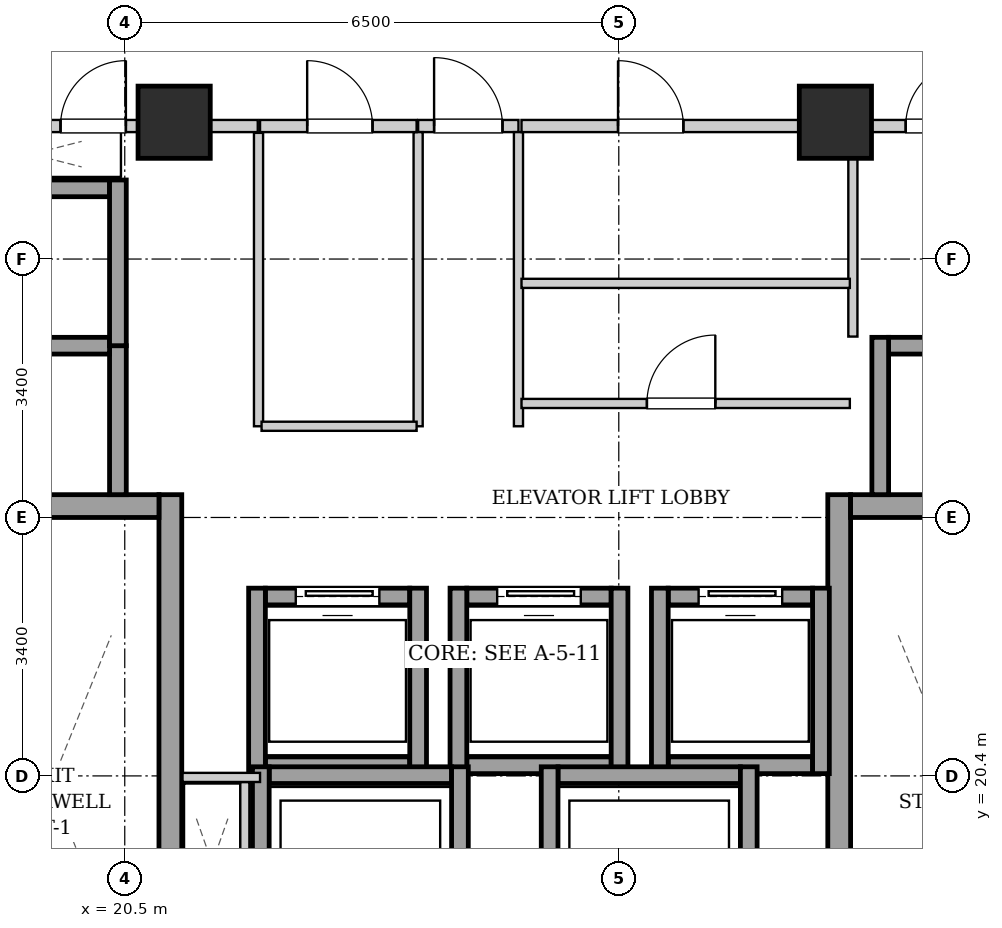
"""IFC4 building model, lengths in metres.
Left out: names, types, materials, properties, quantities, classifications, styles, units other than length and angle.
Written with IfcOpenShell. Run it as: python <this file> out.ifc"""

import sys

from ifc_helpers import new_model, si_unit, direction, frame, frame_2d, origin, origin_2d, place, context, subcontext, project, spatial, rectangle, extrude, element, fill, save


model = new_model("IFC4")
c1 = context("Model", 3, precision=1e-05, world=origin(), true_north=direction((0.0, 1.0)))
c2 = subcontext(c1, "Body", "Model", "MODEL_VIEW")
j1 = project(units=[si_unit("LENGTHUNIT", "METRE"), si_unit("PLANEANGLEUNIT", "RADIAN")], contexts=[c1])
p1 = place(None, origin())
s1 = spatial("IfcSite", under=j1, at=p1, CompositionType="ELEMENT")
p2 = place(p1, origin())
s2 = spatial("IfcBuilding", under=s1, at=p2, CompositionType="ELEMENT")
p3 = place(p2, frame((0.0, 0.0, 134.15)))
s3 = spatial("IfcBuildingStorey", under=s2, at=p3, CompositionType="ELEMENT", Elevation=134.15)
for number, where, z_axis, x_axis in (
    (1, (21.15, 29.0, 0.0), (0.0, 0.0, 1.0), (1.0, 0.0, 0.0)),
    (2, (29.85, 29.0, 0.0), (0.0, 0.0, 1.0), (1.0, 0.0, 0.0)),
):
    element("IfcColumn", number, at=place(p3, frame(where, z_axis=z_axis, x_axis=x_axis)), inside=s3, PredefinedType="COLUMN", context=c2, shape_type="SweptSolid", body=[
        extrude(rectangle(XDim=0.95, YDim=0.95, at=origin_2d()), origin(), (0.0, 0.0, 1.0), 3.25),
    ])
p4 = place(p3, frame((21.1, 15.1, 0.0), z_axis=(0.0, 0.0, 1.0), x_axis=(0.0, 1.0, 0.0)))
e3 = element("IfcWall", 3, at=p4, inside=s3, PredefinedType="SHEAR", context=c2, shape_type="SweptSolid", body=[
    extrude(rectangle(XDim=9.0, YDim=0.3, at=frame_2d((4.5, 0.0))), origin(), (0.0, 0.0, 1.0), 2.99),
])
p5 = place(p3, frame((18.1, 23.95, 0.0), z_axis=(0.0, 0.0, 1.0), x_axis=(1.0, 0.0, 0.0)))
e4 = element("IfcWall", 4, at=p5, inside=s3, PredefinedType="SHEAR", context=c2, shape_type="SweptSolid", body=[
    extrude(rectangle(XDim=2.85, YDim=0.3, at=frame_2d((1.425, 0.0))), origin(), (0.0, 0.0, 1.0), 2.99),
])
p6 = place(p3, frame((29.9, 15.1, 0.0), z_axis=(0.0, 0.0, 1.0), x_axis=(0.0, 1.0, 0.0)))
e5 = element("IfcWall", 5, at=p6, inside=s3, PredefinedType="SHEAR", context=c2, shape_type="SweptSolid", body=[
    extrude(rectangle(XDim=9.0, YDim=0.3, at=frame_2d((4.5, 0.0))), origin(), (0.0, 0.0, 1.0), 2.99),
])
p7 = place(p3, frame((30.05, 23.95, 0.0), z_axis=(0.0, 0.0, 1.0), x_axis=(1.0, 0.0, 0.0)))
e6 = element("IfcWall", 6, at=p7, inside=s3, PredefinedType="SHEAR", context=c2, shape_type="SweptSolid", body=[
    extrude(rectangle(XDim=2.85, YDim=0.3, at=frame_2d((1.425, 0.0))), origin(), (0.0, 0.0, 1.0), 2.99),
])
p8 = place(p3, frame((22.35, 20.54, 0.0), z_axis=(0.0, 0.0, 1.0), x_axis=(1.0, 0.0, 0.0)))
e7 = element("IfcWall", 7, at=p8, inside=s3, PredefinedType="SHEAR", context=c2, shape_type="SweptSolid", body=[
    extrude(rectangle(XDim=1.9, YDim=0.22, at=frame_2d((0.95, 0.0))), origin(), (0.0, 0.0, 1.0), 2.99),
])
p9 = place(p3, frame((22.35, 22.76, 0.0), z_axis=(0.0, 0.0, 1.0), x_axis=(1.0, 0.0, 0.0)))
e8 = element("IfcWall", 8, at=p9, inside=s3, PredefinedType="SHEAR", context=c2, shape_type="SweptSolid", body=[
    extrude(rectangle(XDim=1.9, YDim=0.22, at=frame_2d((0.95, 0.0))), origin(), (0.0, 0.0, 1.0), 2.99),
])
p10 = place(p9, frame((0.4, 0.0, 0.0)))
e9 = element("IfcOpeningElement", 9, at=p10, cuts=e8, PredefinedType="OPENING", context=c2, shape_type="SweptSolid", body=[
    extrude(rectangle(XDim=1.1, YDim=2.15, at=frame_2d((0.55, 1.075))), frame((0.0, 0.12, 0.0), z_axis=(0.0, -1.0, 0.0), x_axis=(1.0, 0.0, 0.0)), (0.0, 0.0, 1.0), 0.24),
])
for number, where, z_axis, x_axis in (
    (10, (22.24, 20.43, 0.0), (0.0, 0.0, 1.0), (0.0, 1.0, 0.0)),
    (11, (24.36, 20.43, 0.0), (0.0, 0.0, 1.0), (0.0, 1.0, 0.0)),
):
    element("IfcWall", number, at=place(p3, frame(where, z_axis=z_axis, x_axis=x_axis)), inside=s3, PredefinedType="SHEAR", context=c2, shape_type="SweptSolid", body=[
        extrude(rectangle(XDim=2.44, YDim=0.22, at=frame_2d((1.22, 0.0))), origin(), (0.0, 0.0, 1.0), 2.99),
    ])
p11 = place(p3, frame((25.0, 20.54, 0.0), z_axis=(0.0, 0.0, 1.0), x_axis=(1.0, 0.0, 0.0)))
e12 = element("IfcWall", 12, at=p11, inside=s3, PredefinedType="SHEAR", context=c2, shape_type="SweptSolid", body=[
    extrude(rectangle(XDim=1.9, YDim=0.22, at=frame_2d((0.95, 0.0))), origin(), (0.0, 0.0, 1.0), 2.99),
])
p12 = place(p3, frame((25.0, 22.76, 0.0), z_axis=(0.0, 0.0, 1.0), x_axis=(1.0, 0.0, 0.0)))
e13 = element("IfcWall", 13, at=p12, inside=s3, PredefinedType="SHEAR", context=c2, shape_type="SweptSolid", body=[
    extrude(rectangle(XDim=1.9, YDim=0.22, at=frame_2d((0.95, 0.0))), origin(), (0.0, 0.0, 1.0), 2.99),
])
p13 = place(p12, frame((0.4, 0.0, 0.0)))
e14 = element("IfcOpeningElement", 14, at=p13, cuts=e13, PredefinedType="OPENING", context=c2, shape_type="SweptSolid", body=[
    extrude(rectangle(XDim=1.1, YDim=2.15, at=frame_2d((0.55, 1.075))), frame((0.0, 0.12, 0.0), z_axis=(0.0, -1.0, 0.0), x_axis=(1.0, 0.0, 0.0)), (0.0, 0.0, 1.0), 0.24),
])
for number, where, z_axis, x_axis in (
    (15, (24.89, 20.43, 0.0), (0.0, 0.0, 1.0), (0.0, 1.0, 0.0)),
    (16, (27.01, 20.43, 0.0), (0.0, 0.0, 1.0), (0.0, 1.0, 0.0)),
):
    element("IfcWall", number, at=place(p3, frame(where, z_axis=z_axis, x_axis=x_axis)), inside=s3, PredefinedType="SHEAR", context=c2, shape_type="SweptSolid", body=[
        extrude(rectangle(XDim=2.44, YDim=0.22, at=frame_2d((1.22, 0.0))), origin(), (0.0, 0.0, 1.0), 2.99),
    ])
p14 = place(p3, frame((27.65, 20.54, 0.0), z_axis=(0.0, 0.0, 1.0), x_axis=(1.0, 0.0, 0.0)))
e17 = element("IfcWall", 17, at=p14, inside=s3, PredefinedType="SHEAR", context=c2, shape_type="SweptSolid", body=[
    extrude(rectangle(XDim=1.9, YDim=0.22, at=frame_2d((0.95, 0.0))), origin(), (0.0, 0.0, 1.0), 2.99),
])
p15 = place(p3, frame((27.65, 22.76, 0.0), z_axis=(0.0, 0.0, 1.0), x_axis=(1.0, 0.0, 0.0)))
e18 = element("IfcWall", 18, at=p15, inside=s3, PredefinedType="SHEAR", context=c2, shape_type="SweptSolid", body=[
    extrude(rectangle(XDim=1.9, YDim=0.22, at=frame_2d((0.95, 0.0))), origin(), (0.0, 0.0, 1.0), 2.99),
])
p16 = place(p15, frame((0.4, 0.0, 0.0)))
e19 = element("IfcOpeningElement", 19, at=p16, cuts=e18, PredefinedType="OPENING", context=c2, shape_type="SweptSolid", body=[
    extrude(rectangle(XDim=1.1, YDim=2.15, at=frame_2d((0.55, 1.075))), frame((0.0, 0.12, 0.0), z_axis=(0.0, -1.0, 0.0), x_axis=(1.0, 0.0, 0.0)), (0.0, 0.0, 1.0), 0.24),
])
for number, where, z_axis, x_axis in (
    (20, (27.54, 20.43, 0.0), (0.0, 0.0, 1.0), (0.0, 1.0, 0.0)),
    (21, (29.66, 20.43, 0.0), (0.0, 0.0, 1.0), (0.0, 1.0, 0.0)),
):
    element("IfcWall", number, at=place(p3, frame(where, z_axis=z_axis, x_axis=x_axis)), inside=s3, PredefinedType="SHEAR", context=c2, shape_type="SweptSolid", body=[
        extrude(rectangle(XDim=2.44, YDim=0.22, at=frame_2d((1.22, 0.0))), origin(), (0.0, 0.0, 1.0), 2.99),
    ])
p17 = place(p3, frame((20.41, 24.1, 0.0), z_axis=(0.0, 0.0, 1.0), x_axis=(0.0, 1.0, 0.0)))
e22 = element("IfcWall", 22, at=p17, inside=s3, PredefinedType="SHEAR", context=c2, shape_type="SweptSolid", body=[
    extrude(rectangle(XDim=1.96, YDim=0.22, at=frame_2d((0.98, 0.0))), origin(), (0.0, 0.0, 1.0), 2.99),
])
for number, where, z_axis, x_axis in (
    (23, (18.4, 26.06, 0.0), (0.0, 0.0, 1.0), (1.0, 0.0, 0.0)),
    (24, (18.4, 28.13, 0.0), (0.0, 0.0, 1.0), (1.0, 0.0, 0.0)),
):
    element("IfcWall", number, at=place(p3, frame(where, z_axis=z_axis, x_axis=x_axis)), inside=s3, PredefinedType="SHEAR", context=c2, shape_type="SweptSolid", body=[
        extrude(rectangle(XDim=1.9, YDim=0.22, at=frame_2d((0.95, 0.0))), origin(), (0.0, 0.0, 1.0), 2.99),
    ])
p18 = place(p3, frame((20.41, 26.06, 0.0), z_axis=(0.0, 0.0, 1.0), x_axis=(0.0, 1.0, 0.0)))
e25 = element("IfcWall", 25, at=p18, inside=s3, PredefinedType="SHEAR", context=c2, shape_type="SweptSolid", body=[
    extrude(rectangle(XDim=2.18, YDim=0.22, at=frame_2d((1.09, 0.0))), origin(), (0.0, 0.0, 1.0), 2.99),
])
p19 = place(p3, frame((30.55, 26.06, 0.0), z_axis=(0.0, 0.0, 1.0), x_axis=(1.0, 0.0, 0.0)))
e26 = element("IfcWall", 26, at=p19, inside=s3, PredefinedType="SHEAR", context=c2, shape_type="SweptSolid", body=[
    extrude(rectangle(XDim=1.9, YDim=0.22, at=frame_2d((0.95, 0.0))), origin(), (0.0, 0.0, 1.0), 2.99),
])
p20 = place(p3, frame((30.44, 24.1, 0.0), z_axis=(0.0, 0.0, 1.0), x_axis=(0.0, 1.0, 0.0)))
e27 = element("IfcWall", 27, at=p20, inside=s3, PredefinedType="SHEAR", context=c2, shape_type="SweptSolid", body=[
    extrude(rectangle(XDim=2.07, YDim=0.22, at=frame_2d((1.035, 0.0))), origin(), (0.0, 0.0, 1.0), 2.99),
])
p21 = place(p3, frame((22.4, 20.41, 0.0), z_axis=(0.0, 0.0, 1.0), x_axis=(1.0, 0.0, 0.0)))
e28 = element("IfcWall", 28, at=p21, inside=s3, PredefinedType="SHEAR", context=c2, shape_type="SweptSolid", body=[
    extrude(rectangle(XDim=2.4, YDim=0.22, at=frame_2d((1.2, 0.0))), origin(), (0.0, 0.0, 1.0), 2.99),
])
for number, where, z_axis, x_axis in (
    (29, (22.29, 17.98, 0.0), (0.0, 0.0, 1.0), (0.0, 1.0, 0.0)),
    (30, (24.91, 17.98, 0.0), (0.0, 0.0, 1.0), (0.0, 1.0, 0.0)),
):
    element("IfcWall", number, at=place(p3, frame(where, z_axis=z_axis, x_axis=x_axis)), inside=s3, PredefinedType="SHEAR", context=c2, shape_type="SweptSolid", body=[
        extrude(rectangle(XDim=2.54, YDim=0.22, at=frame_2d((1.27, 0.0))), origin(), (0.0, 0.0, 1.0), 2.99),
    ])
p22 = place(p3, frame((26.2, 20.41, 0.0), z_axis=(0.0, 0.0, 1.0), x_axis=(1.0, 0.0, 0.0)))
e31 = element("IfcWall", 31, at=p22, inside=s3, PredefinedType="SHEAR", context=c2, shape_type="SweptSolid", body=[
    extrude(rectangle(XDim=2.4, YDim=0.22, at=frame_2d((1.2, 0.0))), origin(), (0.0, 0.0, 1.0), 2.99),
])
for number, where, z_axis, x_axis in (
    (32, (26.09, 17.98, 0.0), (0.0, 0.0, 1.0), (0.0, 1.0, 0.0)),
    (33, (28.71, 17.98, 0.0), (0.0, 0.0, 1.0), (0.0, 1.0, 0.0)),
):
    element("IfcWall", number, at=place(p3, frame(where, z_axis=z_axis, x_axis=x_axis)), inside=s3, PredefinedType="SHEAR", context=c2, shape_type="SweptSolid", body=[
        extrude(rectangle(XDim=2.54, YDim=0.22, at=frame_2d((1.27, 0.0))), origin(), (0.0, 0.0, 1.0), 2.99),
    ])
p23 = place(p3, frame((24.36, 28.95, 0.0), z_axis=(0.0, 0.0, 1.0), x_axis=(1.0, 0.0, 0.0)))
e34 = element("IfcWall", 34, at=p23, inside=s3, PredefinedType="PARTITIONING", context=c2, shape_type="SweptSolid", body=[
    extrude(rectangle(XDim=1.32, YDim=0.16, at=frame_2d((0.66, 0.0))), origin(), (0.0, 0.0, 1.0), 2.426),
])
p24 = place(p23, frame((0.21, 0.0, 0.0)))
e35 = element("IfcOpeningElement", 35, at=p24, cuts=e34, PredefinedType="OPENING", context=c2, shape_type="SweptSolid", body=[
    extrude(rectangle(XDim=0.9, YDim=2.05, at=frame_2d((0.45, 1.025))), frame((0.0, 0.09, 0.0), z_axis=(0.0, -1.0, 0.0), x_axis=(1.0, 0.0, 0.0)), (0.0, 0.0, 1.0), 0.18),
])
p25 = place(p3, frame((17.96, 28.95, 0.0), z_axis=(0.0, 0.0, 1.0), x_axis=(1.0, 0.0, 0.0)))
e36 = element("IfcWall", 36, at=p25, inside=s3, PredefinedType="PARTITIONING", context=c2, shape_type="SweptSolid", body=[
    extrude(rectangle(XDim=4.29, YDim=0.16, at=frame_2d((2.145, 0.0))), origin(), (0.0, 0.0, 1.0), 2.426),
])
p26 = place(p25, frame((1.695, 0.0, 0.0)))
e37 = element("IfcOpeningElement", 37, at=p26, cuts=e36, PredefinedType="OPENING", context=c2, shape_type="SweptSolid", body=[
    extrude(rectangle(XDim=0.86, YDim=2.05, at=frame_2d((0.43, 1.025))), frame((0.0, 0.09, 0.0), z_axis=(0.0, -1.0, 0.0), x_axis=(1.0, 0.0, 0.0)), (0.0, 0.0, 1.0), 0.18),
])
p27 = place(p3, frame((22.08, 18.2, 0.0), z_axis=(0.0, 0.0, 1.0), x_axis=(0.0, 1.0, 0.0)))
e38 = element("IfcWall", 38, at=p27, inside=s3, PredefinedType="PARTITIONING", context=c2, shape_type="SweptSolid", body=[
    extrude(rectangle(XDim=2.12, YDim=0.12, at=frame_2d((1.06, 0.0))), origin(), (0.0, 0.0, 1.0), 2.99),
])
p28 = place(p3, frame((22.28, 20.38, 0.0), z_axis=(0.0, 0.0, 1.0), x_axis=(-1.0, 0.0, 0.0)))
e39 = element("IfcWall", 39, at=p28, inside=s3, PredefinedType="PARTITIONING", context=c2, shape_type="SweptSolid", body=[
    extrude(rectangle(XDim=1.02, YDim=0.12, at=frame_2d((0.51, 0.0))), origin(), (0.0, 0.0, 1.0), 2.99),
])
for number, where, z_axis, x_axis in (
    (40, (24.36, 25.0, 0.0), (0.0, 0.0, 1.0), (0.0, 1.0, 0.0)),
    (41, (25.68, 25.0, 0.0), (0.0, 0.0, 1.0), (0.0, 1.0, 0.0)),
):
    element("IfcWall", number, at=place(p3, frame(where, z_axis=z_axis, x_axis=x_axis)), inside=s3, PredefinedType="PARTITIONING", context=c2, shape_type="SweptSolid", body=[
        extrude(rectangle(XDim=3.87, YDim=0.12, at=frame_2d((1.935, 0.0))), origin(), (0.0, 0.0, 1.0), 2.99),
    ])
p29 = place(p3, frame((30.08, 26.18, 0.0), z_axis=(0.0, 0.0, 1.0), x_axis=(0.0, 1.0, 0.0)))
e42 = element("IfcWall", 42, at=p29, inside=s3, PredefinedType="PARTITIONING", context=c2, shape_type="SweptSolid", body=[
    extrude(rectangle(XDim=2.68, YDim=0.12, at=frame_2d((1.34, 0.0))), origin(), (0.0, 0.0, 1.0), 2.99),
])
p30 = place(p3, frame((30.08, 28.95, 0.0), z_axis=(0.0, 0.0, 1.0), x_axis=(1.0, 0.0, 0.0)))
e43 = element("IfcWall", 43, at=p30, inside=s3, PredefinedType="PARTITIONING", context=c2, shape_type="SweptSolid", body=[
    extrude(rectangle(XDim=2.96, YDim=0.16, at=frame_2d((1.48, 0.0))), origin(), (0.0, 0.0, 1.0), 2.99),
])
p31 = place(p30, frame((0.695, 0.0, 0.0)))
e44 = element("IfcOpeningElement", 44, at=p31, cuts=e43, PredefinedType="OPENING", context=c2, shape_type="SweptSolid", body=[
    extrude(rectangle(XDim=0.86, YDim=2.05, at=frame_2d((0.43, 1.025))), frame((0.0, 0.09, 0.0), z_axis=(0.0, -1.0, 0.0), x_axis=(1.0, 0.0, 0.0)), (0.0, 0.0, 1.0), 0.18),
])
p32 = place(p3, frame((22.26, 25.0, 0.0), z_axis=(0.0, 0.0, 1.0), x_axis=(0.0, 1.0, 0.0)))
e45 = element("IfcWall", 45, at=p32, inside=s3, PredefinedType="PARTITIONING", context=c2, shape_type="SweptSolid", body=[
    extrude(rectangle(XDim=3.86, YDim=0.12, at=frame_2d((1.93, 0.0))), origin(), (0.0, 0.0, 1.0), 2.99),
])
p33 = place(p3, frame((22.3, 25.0, 0.0), z_axis=(0.0, 0.0, 1.0), x_axis=(1.0, 0.0, 0.0)))
e46 = element("IfcWall", 46, at=p33, inside=s3, PredefinedType="PARTITIONING", context=c2, shape_type="SweptSolid", body=[
    extrude(rectangle(XDim=2.04, YDim=0.12, at=frame_2d((1.02, 0.0))), origin(), (0.0, 0.0, 1.0), 2.99),
])
p34 = place(p3, frame((22.28, 28.95, 0.0), z_axis=(0.0, 0.0, 1.0), x_axis=(1.0, 0.0, 0.0)))
e47 = element("IfcWall", 47, at=p34, inside=s3, PredefinedType="PARTITIONING", context=c2, shape_type="SweptSolid", body=[
    extrude(rectangle(XDim=2.06, YDim=0.16, at=frame_2d((1.03, 0.0))), origin(), (0.0, 0.0, 1.0), 2.426),
])
p35 = place(p34, frame((0.62, 0.0, 0.0)))
e48 = element("IfcOpeningElement", 48, at=p35, cuts=e47, PredefinedType="OPENING", context=c2, shape_type="SweptSolid", body=[
    extrude(rectangle(XDim=0.86, YDim=2.05, at=frame_2d((0.43, 1.025))), frame((0.0, 0.09, 0.0), z_axis=(0.0, -1.0, 0.0), x_axis=(1.0, 0.0, 0.0)), (0.0, 0.0, 1.0), 0.18),
])
p36 = place(p3, frame((25.72, 26.88, 0.0), z_axis=(0.0, 0.0, 1.0), x_axis=(1.0, 0.0, 0.0)))
e49 = element("IfcWall", 49, at=p36, inside=s3, PredefinedType="PARTITIONING", context=c2, shape_type="SweptSolid", body=[
    extrude(rectangle(XDim=4.32, YDim=0.12, at=frame_2d((2.16, 0.0))), origin(), (0.0, 0.0, 1.0), 2.99),
])
p37 = place(p3, frame((25.72, 25.3, 0.0), z_axis=(0.0, 0.0, 1.0), x_axis=(1.0, 0.0, 0.0)))
e50 = element("IfcWall", 50, at=p37, inside=s3, PredefinedType="PARTITIONING", context=c2, shape_type="SweptSolid", body=[
    extrude(rectangle(XDim=4.32, YDim=0.12, at=frame_2d((2.16, 0.0))), origin(), (0.0, 0.0, 1.0), 2.99),
])
p38 = place(p37, frame((1.65, 0.0, 0.0)))
e51 = element("IfcOpeningElement", 51, at=p38, cuts=e50, PredefinedType="OPENING", context=c2, shape_type="SweptSolid", body=[
    extrude(rectangle(XDim=0.9, YDim=2.05, at=frame_2d((0.45, 1.025))), frame((0.0, 0.07, 0.0), z_axis=(0.0, -1.0, 0.0), x_axis=(1.0, 0.0, 0.0)), (0.0, 0.0, 1.0), 0.14),
])
p39 = place(p3, frame((25.72, 28.95, 0.0), z_axis=(0.0, 0.0, 1.0), x_axis=(1.0, 0.0, 0.0)))
e52 = element("IfcWall", 52, at=p39, inside=s3, PredefinedType="PARTITIONING", context=c2, shape_type="SweptSolid", body=[
    extrude(rectangle(XDim=4.32, YDim=0.16, at=frame_2d((2.16, 0.0))), origin(), (0.0, 0.0, 1.0), 2.426),
])
p40 = place(p39, frame((1.27, 0.0, 0.0)))
e53 = element("IfcOpeningElement", 53, at=p40, cuts=e52, PredefinedType="OPENING", context=c2, shape_type="SweptSolid", body=[
    extrude(rectangle(XDim=0.86, YDim=2.05, at=frame_2d((0.43, 1.025))), frame((0.0, 0.09, 0.0), z_axis=(0.0, -1.0, 0.0), x_axis=(1.0, 0.0, 0.0)), (0.0, 0.0, 1.0), 0.18),
])
p41 = place(p10, origin())
e54 = element("IfcDoor", 54, at=p41, inside=s3, OperationType="SLIDING_TO_LEFT", PredefinedType="DOOR", context=c2, shape_type="SweptSolid", body=[
    extrude(rectangle(XDim=1.1, YDim=2.15, at=frame_2d((0.55, 1.075))), frame((0.0, 0.025, 0.0), z_axis=(0.0, -1.0, 0.0), x_axis=(1.0, 0.0, 0.0)), (0.0, 0.0, 1.0), 0.05),
])
fill(e9, e54)
p42 = place(p13, origin())
e55 = element("IfcDoor", 55, at=p42, inside=s3, OperationType="SLIDING_TO_LEFT", PredefinedType="DOOR", context=c2, shape_type="SweptSolid", body=[
    extrude(rectangle(XDim=1.1, YDim=2.15, at=frame_2d((0.55, 1.075))), frame((0.0, 0.025, 0.0), z_axis=(0.0, -1.0, 0.0), x_axis=(1.0, 0.0, 0.0)), (0.0, 0.0, 1.0), 0.05),
])
fill(e14, e55)
p43 = place(p16, origin())
e56 = element("IfcDoor", 56, at=p43, inside=s3, OperationType="SLIDING_TO_LEFT", PredefinedType="DOOR", context=c2, shape_type="SweptSolid", body=[
    extrude(rectangle(XDim=1.1, YDim=2.15, at=frame_2d((0.55, 1.075))), frame((0.0, 0.025, 0.0), z_axis=(0.0, -1.0, 0.0), x_axis=(1.0, 0.0, 0.0)), (0.0, 0.0, 1.0), 0.05),
])
fill(e19, e56)
p44 = place(p24, origin())
e57 = element("IfcDoor", 57, at=p44, inside=s3, OperationType="SINGLE_SWING_LEFT", PredefinedType="DOOR", context=c2, shape_type="SweptSolid", body=[
    extrude(rectangle(XDim=0.9, YDim=2.05, at=frame_2d((0.45, 1.025))), frame((0.0, 0.025, 0.0), z_axis=(0.0, -1.0, 0.0), x_axis=(1.0, 0.0, 0.0)), (0.0, 0.0, 1.0), 0.05),
])
fill(e35, e57)
p45 = place(p26, origin())
e58 = element("IfcDoor", 58, at=p45, inside=s3, OperationType="SINGLE_SWING_RIGHT", PredefinedType="DOOR", context=c2, shape_type="SweptSolid", body=[
    extrude(rectangle(XDim=0.86, YDim=2.05, at=frame_2d((0.43, 1.025))), frame((0.0, 0.025, 0.0), z_axis=(0.0, -1.0, 0.0), x_axis=(1.0, 0.0, 0.0)), (0.0, 0.0, 1.0), 0.05),
])
fill(e37, e58)
p46 = place(p31, origin())
e59 = element("IfcDoor", 59, at=p46, inside=s3, OperationType="SINGLE_SWING_RIGHT", PredefinedType="DOOR", context=c2, shape_type="SweptSolid", body=[
    extrude(rectangle(XDim=0.86, YDim=2.05, at=frame_2d((0.43, 1.025))), frame((0.0, 0.025, 0.0), z_axis=(0.0, -1.0, 0.0), x_axis=(1.0, 0.0, 0.0)), (0.0, 0.0, 1.0), 0.05),
])
fill(e44, e59)
p47 = place(p35, origin())
e60 = element("IfcDoor", 60, at=p47, inside=s3, OperationType="SINGLE_SWING_LEFT", PredefinedType="DOOR", context=c2, shape_type="SweptSolid", body=[
    extrude(rectangle(XDim=0.86, YDim=2.05, at=frame_2d((0.43, 1.025))), frame((0.0, 0.025, 0.0), z_axis=(0.0, -1.0, 0.0), x_axis=(1.0, 0.0, 0.0)), (0.0, 0.0, 1.0), 0.05),
])
fill(e48, e60)
p48 = place(p38, origin())
e61 = element("IfcDoor", 61, at=p48, inside=s3, OperationType="SINGLE_SWING_RIGHT", PredefinedType="DOOR", context=c2, shape_type="SweptSolid", body=[
    extrude(rectangle(XDim=0.9, YDim=2.05, at=frame_2d((0.45, 1.025))), frame((0.0, 0.025, 0.0), z_axis=(0.0, -1.0, 0.0), x_axis=(1.0, 0.0, 0.0)), (0.0, 0.0, 1.0), 0.05),
])
fill(e51, e61)
p49 = place(p40, origin())
e62 = element("IfcDoor", 62, at=p49, inside=s3, OperationType="SINGLE_SWING_LEFT", PredefinedType="DOOR", context=c2, shape_type="SweptSolid", body=[
    extrude(rectangle(XDim=0.86, YDim=2.05, at=frame_2d((0.43, 1.025))), frame((0.0, 0.025, 0.0), z_axis=(0.0, -1.0, 0.0), x_axis=(1.0, 0.0, 0.0)), (0.0, 0.0, 1.0), 0.05),
])
fill(e53, e62)
save(model, sys.argv[1])
